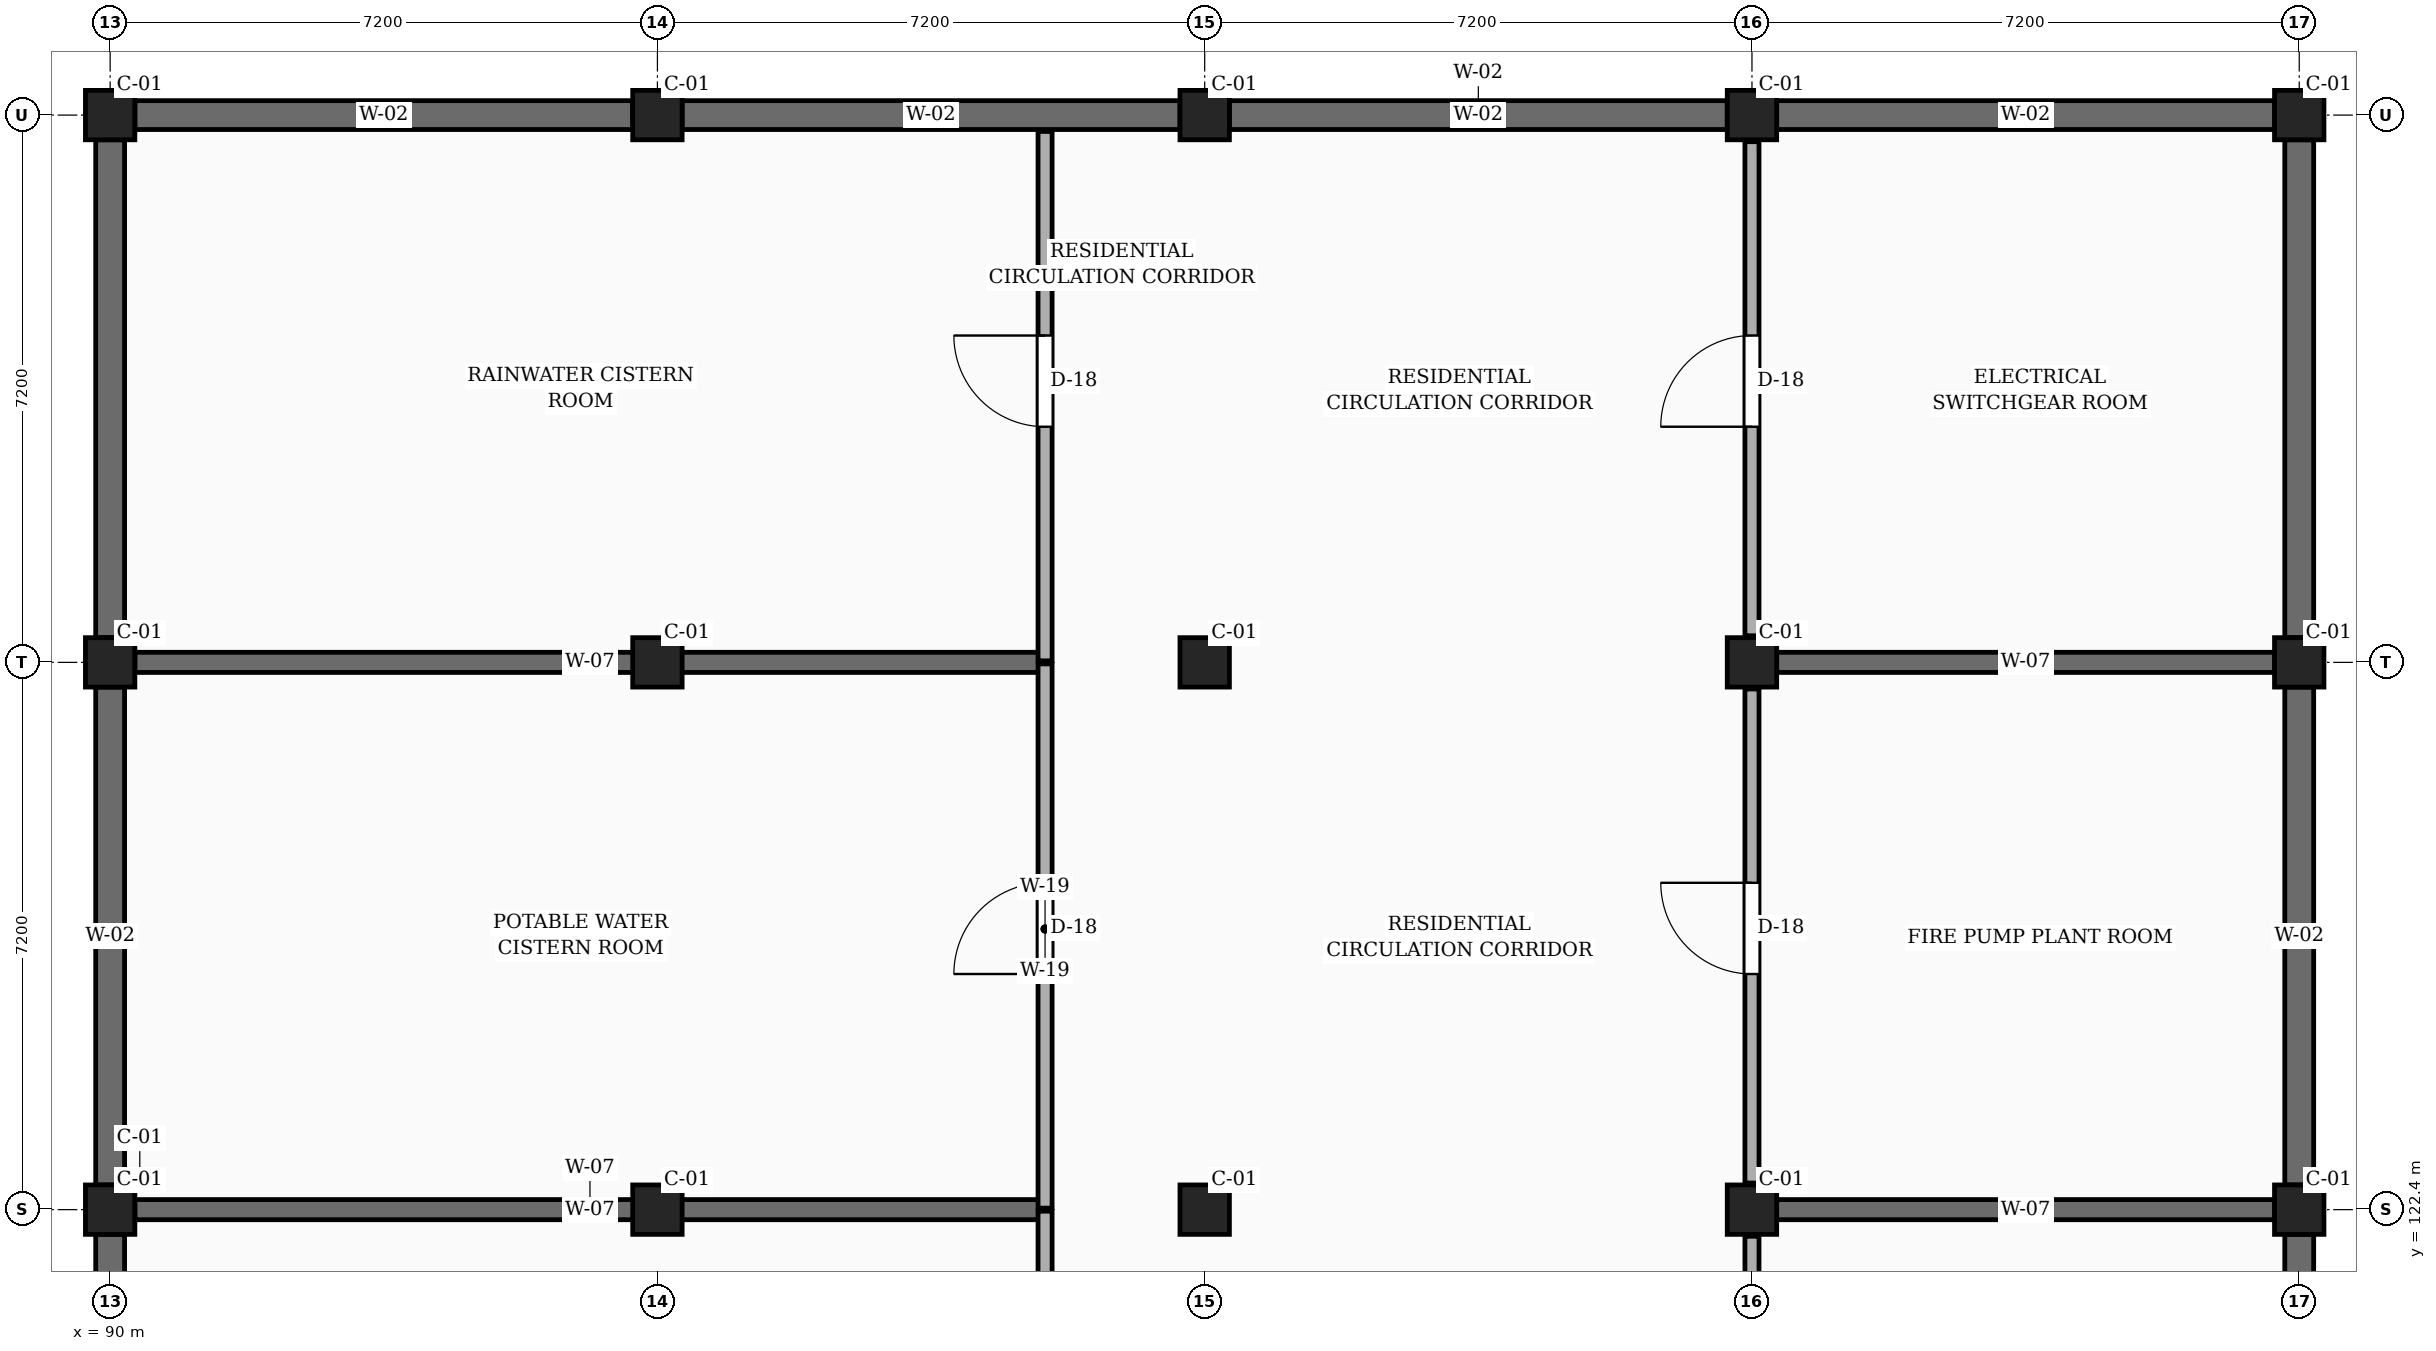
"""IFC4 building model, lengths in metres.
Left out: names, types, materials, properties, quantities, classifications, styles, units other than length and angle.
Written with IfcOpenShell. Run it as: python <this file> out.ifc"""

import sys

from ifc_helpers import new_model, si_unit, direction, frame, frame_2d, origin, origin_2d, place, context, subcontext, project, spatial, rectangle, extrude, element, fill, save


model = new_model("IFC4")
c1 = context("Model", 3, precision=1e-05, world=origin(), true_north=direction((0.0, 1.0)))
c2 = subcontext(c1, "Body", "Model", "MODEL_VIEW")
j1 = project(units=[si_unit("LENGTHUNIT", "METRE"), si_unit("PLANEANGLEUNIT", "RADIAN")], contexts=[c1])
p1 = place(None, origin())
s1 = spatial("IfcSite", under=j1, at=p1, CompositionType="ELEMENT")
p2 = place(p1, origin())
s2 = spatial("IfcBuilding", under=s1, at=p2, CompositionType="ELEMENT")
p3 = place(p2, frame((0.0, 0.0, -4.2)))
s3 = spatial("IfcBuildingStorey", under=s2, at=p3, CompositionType="ELEMENT", Elevation=-4.2)
for number, where, z_axis, x_axis in (
    (1, (90.0, 122.4, 0.0), (0.0, 0.0, 1.0), (1.0, 0.0, 0.0)),
    (2, (90.0, 129.6, 0.0), (0.0, 0.0, 1.0), (1.0, 0.0, 0.0)),
    (3, (90.0, 136.8, 0.0), (0.0, 0.0, 1.0), (1.0, 0.0, 0.0)),
    (4, (97.2, 122.4, 0.0), (0.0, 0.0, 1.0), (1.0, 0.0, 0.0)),
    (5, (97.2, 129.6, 0.0), (0.0, 0.0, 1.0), (1.0, 0.0, 0.0)),
    (6, (97.2, 136.8, 0.0), (0.0, 0.0, 1.0), (1.0, 0.0, 0.0)),
    (7, (104.4, 122.4, 0.0), (0.0, 0.0, 1.0), (1.0, 0.0, 0.0)),
    (8, (104.4, 129.6, 0.0), (0.0, 0.0, 1.0), (1.0, 0.0, 0.0)),
    (9, (104.4, 136.8, 0.0), (0.0, 0.0, 1.0), (1.0, 0.0, 0.0)),
    (10, (111.6, 122.4, 0.0), (0.0, 0.0, 1.0), (1.0, 0.0, 0.0)),
    (11, (111.6, 129.6, 0.0), (0.0, 0.0, 1.0), (1.0, 0.0, 0.0)),
    (12, (111.6, 136.8, 0.0), (0.0, 0.0, 1.0), (1.0, 0.0, 0.0)),
    (13, (118.8, 122.4, 0.0), (0.0, 0.0, 1.0), (1.0, 0.0, 0.0)),
    (14, (118.8, 129.6, 0.0), (0.0, 0.0, 1.0), (1.0, 0.0, 0.0)),
    (15, (118.8, 136.8, 0.0), (0.0, 0.0, 1.0), (1.0, 0.0, 0.0)),
):
    element("IfcColumn", number, at=place(p3, frame(where, z_axis=z_axis, x_axis=x_axis)), inside=s3, PredefinedType="COLUMN", context=c2, shape_type="SweptSolid", body=[
        extrude(rectangle(XDim=0.65, YDim=0.65, at=origin_2d()), origin(), (0.0, 0.0, 1.0), 4.2),
    ])
for number, where, z_axis, x_axis in (
    (16, (96.875, 136.8, 0.0), (0.0, 0.0, 1.0), (-1.0, 0.0, 0.0)),
    (17, (104.075, 136.8, 0.0), (0.0, 0.0, 1.0), (-1.0, 0.0, 0.0)),
):
    element("IfcWall", number, at=place(p3, frame(where, z_axis=z_axis, x_axis=x_axis)), inside=s3, PredefinedType="USERDEFINED", context=c2, shape_type="SweptSolid", body=[
        extrude(rectangle(XDim=6.55, YDim=0.38, at=frame_2d((3.275, 0.0))), origin(), (0.0, 0.0, 1.0), 3.03),
    ])
p4 = place(p3, frame((111.275, 136.8, 0.0), z_axis=(0.0, 0.0, 1.0), x_axis=(-1.0, 0.0, 0.0)))
e18 = element("IfcWall", 18, at=p4, inside=s3, PredefinedType="USERDEFINED", context=c2, shape_type="SweptSolid", body=[
    extrude(rectangle(XDim=6.55, YDim=0.38, at=frame_2d((3.275, 0.0))), origin(), (0.0, 0.0, 1.0), 3.03),
])
for number, where, z_axis, x_axis in (
    (19, (118.475, 136.8, 0.0), (0.0, 0.0, 1.0), (-1.0, 0.0, 0.0)),
    (20, (118.8, 115.525, 0.0), (0.0, 0.0, 1.0), (0.0, 1.0, 0.0)),
    (21, (90.0, 122.075, 0.0), (0.0, 0.0, 1.0), (0.0, -1.0, 0.0)),
):
    element("IfcWall", number, at=place(p3, frame(where, z_axis=z_axis, x_axis=x_axis)), inside=s3, PredefinedType="USERDEFINED", context=c2, shape_type="SweptSolid", body=[
        extrude(rectangle(XDim=6.55, YDim=0.38, at=frame_2d((3.275, 0.0))), origin(), (0.0, 0.0, 1.0), 3.03),
    ])
for number, where, z_axis, x_axis in (
    (22, (118.8, 122.725, 0.0), (0.0, 0.0, 1.0), (0.0, 1.0, 0.0)),
    (23, (90.0, 129.275, 0.0), (0.0, 0.0, 1.0), (0.0, -1.0, 0.0)),
):
    element("IfcWall", number, at=place(p3, frame(where, z_axis=z_axis, x_axis=x_axis)), inside=s3, PredefinedType="USERDEFINED", context=c2, shape_type="SweptSolid", body=[
        extrude(rectangle(XDim=6.55, YDim=0.38, at=frame_2d((3.275, 0.0))), origin(), (0.0, 0.0, 1.0), 3.03),
    ])
for number, where, z_axis, x_axis in (
    (24, (118.8, 129.925, 0.0), (0.0, 0.0, 1.0), (0.0, 1.0, 0.0)),
    (25, (90.0, 136.475, 0.0), (0.0, 0.0, 1.0), (0.0, -1.0, 0.0)),
):
    element("IfcWall", number, at=place(p3, frame(where, z_axis=z_axis, x_axis=x_axis)), inside=s3, PredefinedType="USERDEFINED", context=c2, shape_type="SweptSolid", body=[
        extrude(rectangle(XDim=6.55, YDim=0.38, at=frame_2d((3.275, 0.0))), origin(), (0.0, 0.0, 1.0), 3.03),
    ])
p5 = place(p3, frame((90.325, 122.4, 0.0), z_axis=(0.0, 0.0, 1.0), x_axis=(1.0, 0.0, 0.0)))
e26 = element("IfcWall", 26, at=p5, inside=s3, PredefinedType="SOLIDWALL", context=c2, shape_type="SweptSolid", body=[
    extrude(rectangle(XDim=11.975, YDim=0.265, at=frame_2d((5.988, 0.0))), origin(), (0.0, 0.0, 1.0), 3.18),
])
p6 = place(p3, frame((111.925, 122.4, 0.0), z_axis=(0.0, 0.0, 1.0), x_axis=(1.0, 0.0, 0.0)))
e27 = element("IfcWall", 27, at=p6, inside=s3, PredefinedType="SOLIDWALL", context=c2, shape_type="SweptSolid", body=[
    extrude(rectangle(XDim=6.55, YDim=0.265, at=frame_2d((3.275, 0.0))), origin(), (0.0, 0.0, 1.0), 3.18),
])
p7 = place(p3, frame((90.325, 129.6, 0.0), z_axis=(0.0, 0.0, 1.0), x_axis=(1.0, 0.0, 0.0)))
e28 = element("IfcWall", 28, at=p7, inside=s3, PredefinedType="SOLIDWALL", context=c2, shape_type="SweptSolid", body=[
    extrude(rectangle(XDim=11.975, YDim=0.265, at=frame_2d((5.988, 0.0))), origin(), (0.0, 0.0, 1.0), 3.18),
])
p8 = place(p3, frame((111.925, 129.6, 0.0), z_axis=(0.0, 0.0, 1.0), x_axis=(1.0, 0.0, 0.0)))
e29 = element("IfcWall", 29, at=p8, inside=s3, PredefinedType="SOLIDWALL", context=c2, shape_type="SweptSolid", body=[
    extrude(rectangle(XDim=6.55, YDim=0.265, at=frame_2d((3.275, 0.0))), origin(), (0.0, 0.0, 1.0), 3.18),
])
p9 = place(p3, frame((102.3, 115.22, 0.0), z_axis=(0.0, 0.0, 1.0), x_axis=(0.0, 1.0, 0.0)))
e30 = element("IfcWall", 30, at=p9, inside=s3, PredefinedType="PARTITIONING", context=c2, shape_type="SweptSolid", body=[
    extrude(rectangle(XDim=7.16, YDim=0.185, at=frame_2d((3.58, 0.0))), origin(), (0.0, 0.0, 1.0), 3.315),
])
p10 = place(p9, frame((3.08, 0.0, 0.0)))
e31 = element("IfcOpeningElement", 31, at=p10, cuts=e30, PredefinedType="OPENING", context=c2, shape_type="SweptSolid", body=[
    extrude(rectangle(XDim=1.2, YDim=2.2, at=frame_2d((0.6, 1.1))), frame((0.0, 0.103, 0.0), z_axis=(0.0, -1.0, 0.0), x_axis=(1.0, 0.0, 0.0)), (0.0, 0.0, 1.0), 0.205),
])
p11 = place(p3, frame((102.3, 122.42, 0.0), z_axis=(0.0, 0.0, 1.0), x_axis=(0.0, 1.0, 0.0)))
e32 = element("IfcWall", 32, at=p11, inside=s3, PredefinedType="PARTITIONING", context=c2, shape_type="SweptSolid", body=[
    extrude(rectangle(XDim=7.16, YDim=0.185, at=frame_2d((3.58, 0.0))), origin(), (0.0, 0.0, 1.0), 3.315),
])
p12 = place(p11, frame((3.08, 0.0, 0.0)))
e33 = element("IfcOpeningElement", 33, at=p12, cuts=e32, PredefinedType="OPENING", context=c2, shape_type="SweptSolid", body=[
    extrude(rectangle(XDim=1.2, YDim=2.2, at=frame_2d((0.6, 1.1))), frame((0.0, 0.103, 0.0), z_axis=(0.0, -1.0, 0.0), x_axis=(1.0, 0.0, 0.0)), (0.0, 0.0, 1.0), 0.205),
])
p13 = place(p3, frame((102.3, 129.62, 0.0), z_axis=(0.0, 0.0, 1.0), x_axis=(0.0, 1.0, 0.0)))
e34 = element("IfcWall", 34, at=p13, inside=s3, PredefinedType="PARTITIONING", context=c2, shape_type="SweptSolid", body=[
    extrude(rectangle(XDim=6.965, YDim=0.185, at=frame_2d((3.482, 0.0))), origin(), (0.0, 0.0, 1.0), 3.315),
])
p14 = place(p13, frame((3.08, 0.0, 0.0)))
e35 = element("IfcOpeningElement", 35, at=p14, cuts=e34, PredefinedType="OPENING", context=c2, shape_type="SweptSolid", body=[
    extrude(rectangle(XDim=1.2, YDim=2.2, at=frame_2d((0.6, 1.1))), frame((0.0, 0.103, 0.0), z_axis=(0.0, -1.0, 0.0), x_axis=(1.0, 0.0, 0.0)), (0.0, 0.0, 1.0), 0.205),
])
p15 = place(p3, frame((111.6, 115.55, 0.0), z_axis=(0.0, 0.0, 1.0), x_axis=(0.0, 1.0, 0.0)))
e36 = element("IfcWall", 36, at=p15, inside=s3, PredefinedType="PARTITIONING", context=c2, shape_type="SweptSolid", body=[
    extrude(rectangle(XDim=6.5, YDim=0.185, at=frame_2d((3.25, 0.0))), origin(), (0.0, 0.0, 1.0), 3.08),
])
p16 = place(p15, frame((2.75, 0.0, 0.0)))
e37 = element("IfcOpeningElement", 37, at=p16, cuts=e36, PredefinedType="OPENING", context=c2, shape_type="SweptSolid", body=[
    extrude(rectangle(XDim=1.2, YDim=2.2, at=frame_2d((0.6, 1.1))), frame((0.0, 0.103, 0.0), z_axis=(0.0, -1.0, 0.0), x_axis=(1.0, 0.0, 0.0)), (0.0, 0.0, 1.0), 0.205),
])
p17 = place(p3, frame((111.6, 122.75, 0.0), z_axis=(0.0, 0.0, 1.0), x_axis=(0.0, 1.0, 0.0)))
e38 = element("IfcWall", 38, at=p17, inside=s3, PredefinedType="PARTITIONING", context=c2, shape_type="SweptSolid", body=[
    extrude(rectangle(XDim=6.5, YDim=0.185, at=frame_2d((3.25, 0.0))), origin(), (0.0, 0.0, 1.0), 3.08),
])
p18 = place(p17, frame((2.75, 0.0, 0.0)))
e39 = element("IfcOpeningElement", 39, at=p18, cuts=e38, PredefinedType="OPENING", context=c2, shape_type="SweptSolid", body=[
    extrude(rectangle(XDim=1.2, YDim=2.2, at=frame_2d((0.6, 1.1))), frame((0.0, 0.103, 0.0), z_axis=(0.0, -1.0, 0.0), x_axis=(1.0, 0.0, 0.0)), (0.0, 0.0, 1.0), 0.205),
])
p19 = place(p3, frame((111.6, 129.95, 0.0), z_axis=(0.0, 0.0, 1.0), x_axis=(0.0, 1.0, 0.0)))
e40 = element("IfcWall", 40, at=p19, inside=s3, PredefinedType="PARTITIONING", context=c2, shape_type="SweptSolid", body=[
    extrude(rectangle(XDim=6.5, YDim=0.185, at=frame_2d((3.25, 0.0))), origin(), (0.0, 0.0, 1.0), 3.08),
])
p20 = place(p19, frame((2.75, 0.0, 0.0)))
e41 = element("IfcOpeningElement", 41, at=p20, cuts=e40, PredefinedType="OPENING", context=c2, shape_type="SweptSolid", body=[
    extrude(rectangle(XDim=1.2, YDim=2.2, at=frame_2d((0.6, 1.1))), frame((0.0, 0.103, 0.0), z_axis=(0.0, -1.0, 0.0), x_axis=(1.0, 0.0, 0.0)), (0.0, 0.0, 1.0), 0.205),
])
p21 = place(p12, origin())
e42 = element("IfcDoor", 42, at=p21, inside=s3, OperationType="SINGLE_SWING_LEFT", PredefinedType="DOOR", context=c2, shape_type="SweptSolid", body=[
    extrude(rectangle(XDim=1.2, YDim=2.2, at=frame_2d((0.6, 1.1))), frame((0.0, 0.025, 0.0), z_axis=(0.0, -1.0, 0.0), x_axis=(1.0, 0.0, 0.0)), (0.0, 0.0, 1.0), 0.05),
])
fill(e33, e42)
p22 = place(p14, origin())
e43 = element("IfcDoor", 43, at=p22, inside=s3, OperationType="SINGLE_SWING_RIGHT", PredefinedType="DOOR", context=c2, shape_type="SweptSolid", body=[
    extrude(rectangle(XDim=1.2, YDim=2.2, at=frame_2d((0.6, 1.1))), frame((0.0, 0.025, 0.0), z_axis=(0.0, -1.0, 0.0), x_axis=(1.0, 0.0, 0.0)), (0.0, 0.0, 1.0), 0.05),
])
fill(e35, e43)
p23 = place(p18, origin())
e44 = element("IfcDoor", 44, at=p23, inside=s3, OperationType="SINGLE_SWING_RIGHT", PredefinedType="DOOR", context=c2, shape_type="SweptSolid", body=[
    extrude(rectangle(XDim=1.2, YDim=2.2, at=frame_2d((0.6, 1.1))), frame((0.0, 0.025, 0.0), z_axis=(0.0, -1.0, 0.0), x_axis=(1.0, 0.0, 0.0)), (0.0, 0.0, 1.0), 0.05),
])
fill(e39, e44)
p24 = place(p20, origin())
e45 = element("IfcDoor", 45, at=p24, inside=s3, OperationType="SINGLE_SWING_LEFT", PredefinedType="DOOR", context=c2, shape_type="SweptSolid", body=[
    extrude(rectangle(XDim=1.2, YDim=2.2, at=frame_2d((0.6, 1.1))), frame((0.0, 0.025, 0.0), z_axis=(0.0, -1.0, 0.0), x_axis=(1.0, 0.0, 0.0)), (0.0, 0.0, 1.0), 0.05),
])
fill(e41, e45)
save(model, sys.argv[1])
